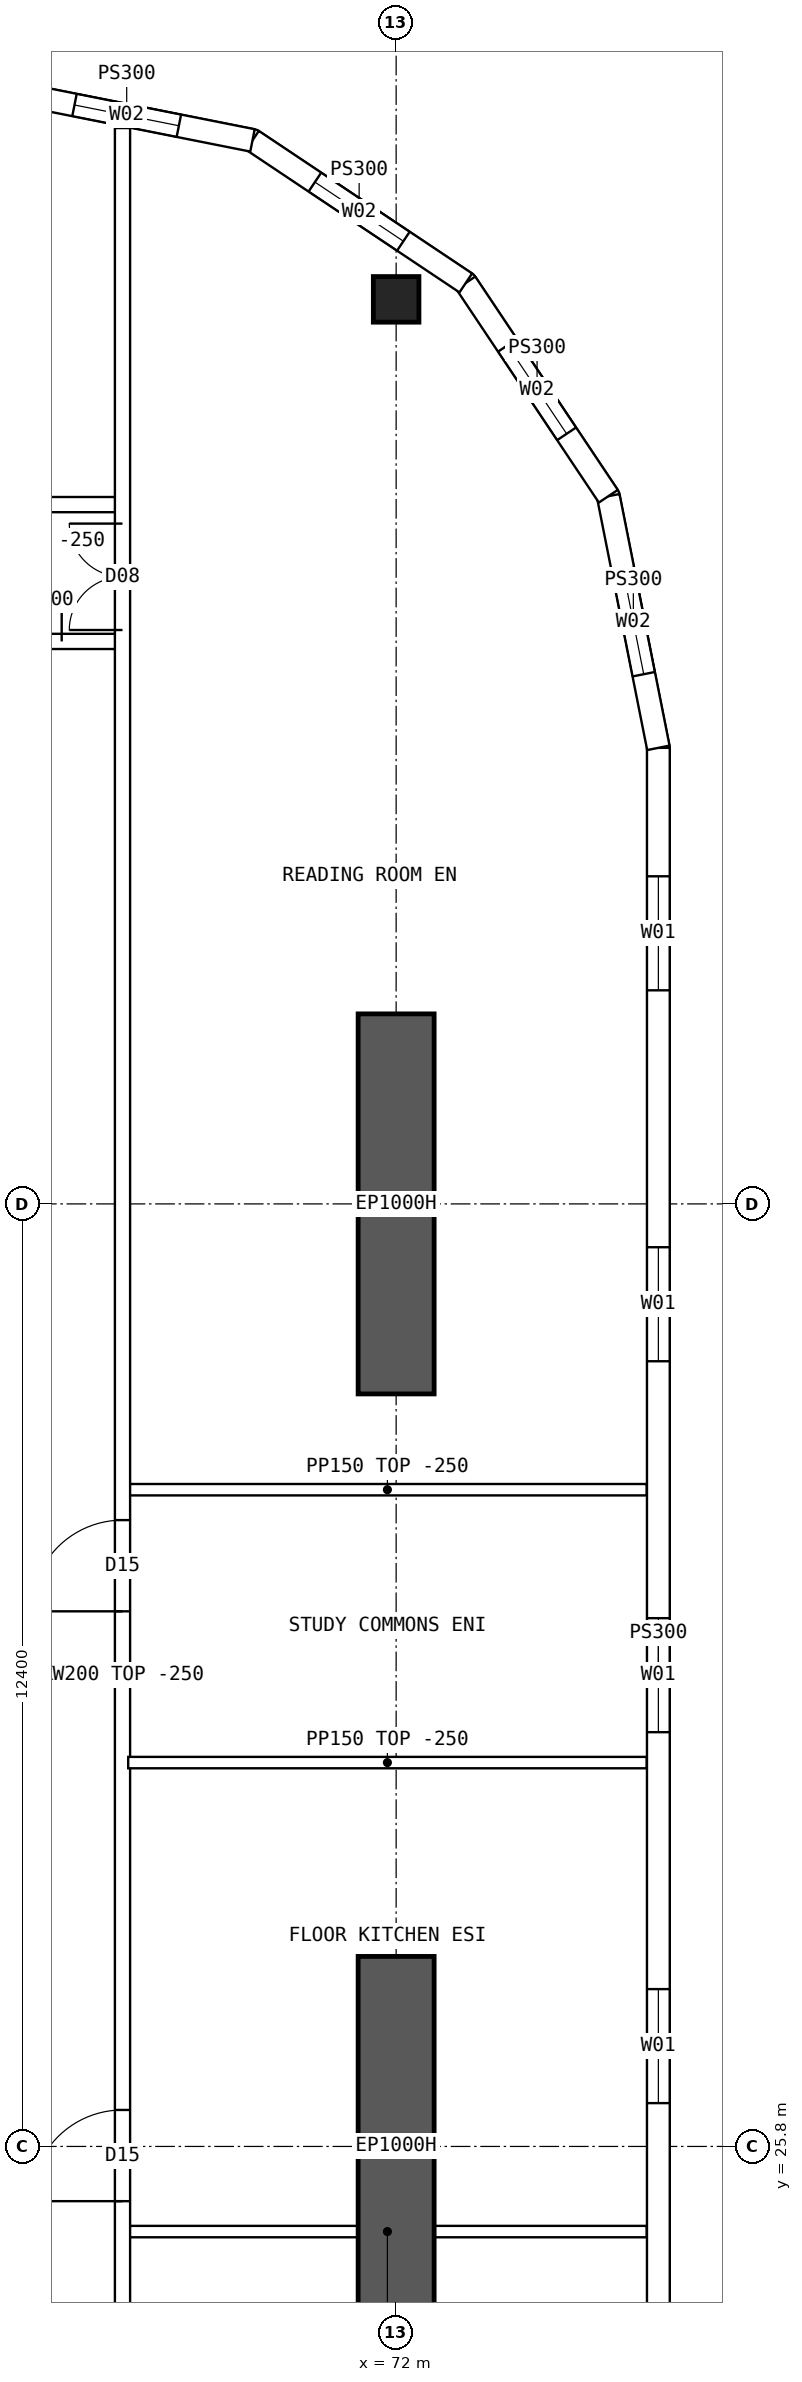
"""IFC4 building model, lengths in metres.
Left out: names, types, materials, properties, quantities, classifications, styles, units other than length and angle.
Written with IfcOpenShell. Run it as: python <this file> out.ifc"""

import sys

from ifc_helpers import new_model, si_unit, direction, frame, frame_2d, origin, origin_2d, place, context, subcontext, project, spatial, polyline, rectangle, hollow_rectangle, outline, extrude, element, fill, save


model = new_model("IFC4")
c1 = context("Model", 3, precision=1e-05, world=origin(), true_north=direction((0.0, 1.0)))
c2 = subcontext(c1, "Body", "Model", "MODEL_VIEW")
j1 = project(units=[si_unit("LENGTHUNIT", "METRE"), si_unit("PLANEANGLEUNIT", "RADIAN")], contexts=[c1])
p1 = place(None, origin())
s1 = spatial("IfcSite", under=j1, at=p1, CompositionType="ELEMENT")
p2 = place(p1, origin())
s2 = spatial("IfcBuilding", under=s1, at=p2, CompositionType="ELEMENT")
p3 = place(p2, frame((0.0, 0.0, 224.05)))
s3 = spatial("IfcBuildingStorey", under=s2, at=p3, CompositionType="ELEMENT", Elevation=224.05)
p4 = place(p3, frame((72.0, 50.1, 0.0), z_axis=(0.0, 0.0, 1.0), x_axis=(1.0, 0.0, 0.0)))
e1 = element("IfcColumn", 1, at=p4, inside=s3, PredefinedType="COLUMN", context=c2, shape_type="SweptSolid", body=[
    extrude(hollow_rectangle(XDim=0.6, YDim=0.6, WallThickness=0.06, at=origin_2d()), origin(), (0.0, 0.0, 1.0), 3.75),
])
for number, where, z_axis, x_axis in (
    (2, (72.0, 23.3, 0.0), (0.0, 0.0, 1.0), (0.0, 1.0, 0.0)),
    (3, (72.0, 35.7, 0.0), (0.0, 0.0, 1.0), (0.0, 1.0, 0.0)),
):
    element("IfcWall", number, at=place(p3, frame(where, z_axis=z_axis, x_axis=x_axis)), inside=s3, PredefinedType="SHEAR", context=c2, shape_type="SweptSolid", body=[
        extrude(rectangle(XDim=5.0, YDim=1.0, at=frame_2d((2.5, 0.0))), origin(), (0.0, 0.0, 1.0), 3.75),
    ])
p5 = place(p3, frame((75.45, 19.8, 0.0), z_axis=(0.0, 0.0, 1.0), x_axis=(0.0, 1.0, 0.0)))
e4 = element("IfcWall", 4, at=p5, inside=s3, PredefinedType="SOLIDWALL", context=c2, shape_type="SweptSolid", body=[
    extrude(outline(polyline([(-0.015, -0.15), (24.415, -0.15), (24.385, 0.15), (0.015, 0.15), (-0.015, -0.15)])), origin(), (0.0, 0.0, 1.0), 3.5),
])
p6 = place(p5, frame((1.69, 0.0, 0.9)))
e5 = element("IfcOpeningElement", 5, at=p6, cuts=e4, PredefinedType="OPENING", context=c2, shape_type="SweptSolid", body=[
    extrude(rectangle(XDim=1.5, YDim=2.0, at=frame_2d((0.75, 1.0))), frame((0.0, 0.16, 0.0), z_axis=(0.0, -1.0, 0.0), x_axis=(1.0, 0.0, 0.0)), (0.0, 0.0, 1.0), 0.32),
])
p7 = place(p5, frame((6.57, 0.0, 0.9)))
e6 = element("IfcOpeningElement", 6, at=p7, cuts=e4, PredefinedType="OPENING", context=c2, shape_type="SweptSolid", body=[
    extrude(rectangle(XDim=1.5, YDim=2.0, at=frame_2d((0.75, 1.0))), frame((0.0, 0.16, 0.0), z_axis=(0.0, -1.0, 0.0), x_axis=(1.0, 0.0, 0.0)), (0.0, 0.0, 1.0), 0.32),
])
p8 = place(p5, frame((11.45, 0.0, 0.9)))
e7 = element("IfcOpeningElement", 7, at=p8, cuts=e4, PredefinedType="OPENING", context=c2, shape_type="SweptSolid", body=[
    extrude(rectangle(XDim=1.5, YDim=2.0, at=frame_2d((0.75, 1.0))), frame((0.0, 0.16, 0.0), z_axis=(0.0, -1.0, 0.0), x_axis=(1.0, 0.0, 0.0)), (0.0, 0.0, 1.0), 0.32),
])
p9 = place(p5, frame((16.33, 0.0, 0.9)))
e8 = element("IfcOpeningElement", 8, at=p9, cuts=e4, PredefinedType="OPENING", context=c2, shape_type="SweptSolid", body=[
    extrude(rectangle(XDim=1.5, YDim=2.0, at=frame_2d((0.75, 1.0))), frame((0.0, 0.16, 0.0), z_axis=(0.0, -1.0, 0.0), x_axis=(1.0, 0.0, 0.0)), (0.0, 0.0, 1.0), 0.32),
])
p10 = place(p5, frame((21.21, 0.0, 0.9)))
e9 = element("IfcOpeningElement", 9, at=p10, cuts=e4, PredefinedType="OPENING", context=c2, shape_type="SweptSolid", body=[
    extrude(rectangle(XDim=1.5, YDim=2.0, at=frame_2d((0.75, 1.0))), frame((0.0, 0.16, 0.0), z_axis=(0.0, -1.0, 0.0), x_axis=(1.0, 0.0, 0.0)), (0.0, 0.0, 1.0), 0.32),
])
p11 = place(p3, frame((75.45, 44.2, 0.0), z_axis=(0.0, 0.0, 1.0), x_axis=(-0.19508664885, 0.980786011034, 0.0)))
e10 = element("IfcWall", 10, at=p11, inside=s3, PredefinedType="SOLIDWALL", context=c2, shape_type="SweptSolid", body=[
    extrude(outline(polyline([(-0.015, -0.15), (3.405, -0.15), (3.345, 0.15), (0.015, 0.15), (-0.015, -0.15)])), origin(), (0.0, 0.0, 1.0), 3.5),
])
p12 = place(p11, frame((0.988, 0.0, 0.9)))
e11 = element("IfcOpeningElement", 11, at=p12, cuts=e10, PredefinedType="OPENING", context=c2, shape_type="SweptSolid", body=[
    extrude(rectangle(XDim=1.4, YDim=1.8, at=frame_2d((0.7, 0.9))), frame((0.0, 0.16, 0.0), z_axis=(0.0, -1.0, 0.0), x_axis=(1.0, 0.0, 0.0)), (0.0, 0.0, 1.0), 0.32),
])
p13 = place(p3, frame((74.792, 47.51, 0.0), z_axis=(0.0, 0.0, 1.0), x_axis=(-0.555567969291, 0.831471124873, 0.0)))
e12 = element("IfcWall", 12, at=p13, inside=s3, PredefinedType="SOLIDWALL", context=c2, shape_type="SweptSolid", body=[
    extrude(outline(polyline([(-0.03, -0.15), (3.405, -0.15), (3.345, 0.15), (0.03, 0.15), (-0.03, -0.15)])), origin(), (0.0, 0.0, 1.0), 3.5),
])
p14 = place(p13, frame((0.988, 0.0, 0.9)))
e13 = element("IfcOpeningElement", 13, at=p14, cuts=e12, PredefinedType="OPENING", context=c2, shape_type="SweptSolid", body=[
    extrude(rectangle(XDim=1.4, YDim=1.8, at=frame_2d((0.7, 0.9))), frame((0.0, 0.16, 0.0), z_axis=(0.0, -1.0, 0.0), x_axis=(1.0, 0.0, 0.0)), (0.0, 0.0, 1.0), 0.32),
])
p15 = place(p3, frame((72.917, 50.316, 0.0), z_axis=(0.0, 0.0, 1.0), x_axis=(-0.831460037396, 0.555584562613, 0.0)))
e14 = element("IfcWall", 14, at=p15, inside=s3, PredefinedType="SOLIDWALL", context=c2, shape_type="SweptSolid", body=[
    extrude(outline(polyline([(-0.03, -0.15), (3.405, -0.15), (3.345, 0.15), (0.03, 0.15), (-0.03, -0.15)])), origin(), (0.0, 0.0, 1.0), 3.5),
])
p16 = place(p15, frame((0.988, 0.0, 0.9)))
e15 = element("IfcOpeningElement", 15, at=p16, cuts=e14, PredefinedType="OPENING", context=c2, shape_type="SweptSolid", body=[
    extrude(rectangle(XDim=1.4, YDim=1.8, at=frame_2d((0.7, 0.9))), frame((0.0, 0.16, 0.0), z_axis=(0.0, -1.0, 0.0), x_axis=(1.0, 0.0, 0.0)), (0.0, 0.0, 1.0), 0.32),
])
p17 = place(p3, frame((70.11, 52.192, 0.0), z_axis=(0.0, 0.0, 1.0), x_axis=(-0.98078325777, 0.195100490205, 0.0)))
e16 = element("IfcWall", 16, at=p17, inside=s3, PredefinedType="SOLIDWALL", context=c2, shape_type="SweptSolid", body=[
    extrude(outline(polyline([(-0.03, -0.15), (3.405, -0.15), (3.345, 0.15), (0.03, 0.15), (-0.03, -0.15)])), origin(), (0.0, 0.0, 1.0), 3.5),
])
p18 = place(p17, frame((0.988, 0.0, 0.9)))
e17 = element("IfcOpeningElement", 17, at=p18, cuts=e16, PredefinedType="OPENING", context=c2, shape_type="SweptSolid", body=[
    extrude(rectangle(XDim=1.4, YDim=1.8, at=frame_2d((0.7, 0.9))), frame((0.0, 0.16, 0.0), z_axis=(0.0, -1.0, 0.0), x_axis=(1.0, 0.0, 0.0)), (0.0, 0.0, 1.0), 0.32),
])
p19 = place(p3, frame((66.35, 47.4, 0.0), z_axis=(0.0, 0.0, 1.0), x_axis=(1.0, 0.0, 0.0)))
e18 = element("IfcWall", 18, at=p19, inside=s3, PredefinedType="SOLIDWALL", context=c2, shape_type="SweptSolid", body=[
    extrude(rectangle(XDim=2.05, YDim=0.2, at=frame_2d((1.025, 0.0))), origin(), (0.0, 0.0, 1.0), 3.5),
])
p20 = place(p19, frame((0.2, 0.0, 0.0)))
e19 = element("IfcOpeningElement", 19, at=p20, cuts=e18, PredefinedType="OPENING", context=c2, shape_type="SweptSolid", body=[
    extrude(rectangle(XDim=0.9, YDim=2.1, at=frame_2d((0.45, 1.05))), frame((0.0, 0.11, 0.0), z_axis=(0.0, -1.0, 0.0), x_axis=(1.0, 0.0, 0.0)), (0.0, 0.0, 1.0), 0.22),
])
p21 = place(p3, frame((66.35, 45.6, 0.0), z_axis=(0.0, 0.0, 1.0), x_axis=(1.0, 0.0, 0.0)))
e20 = element("IfcWall", 20, at=p21, inside=s3, PredefinedType="SOLIDWALL", context=c2, shape_type="SweptSolid", body=[
    extrude(rectangle(XDim=2.05, YDim=0.2, at=frame_2d((1.025, 0.0))), origin(), (0.0, 0.0, 1.0), 3.5),
])
p22 = place(p21, frame((0.05, 0.0, 0.0)))
e21 = element("IfcOpeningElement", 21, at=p22, cuts=e20, PredefinedType="OPENING", context=c2, shape_type="SweptSolid", body=[
    extrude(rectangle(XDim=1.2, YDim=2.1, at=frame_2d((0.6, 1.05))), frame((0.0, 0.11, 0.0), z_axis=(0.0, -1.0, 0.0), x_axis=(1.0, 0.0, 0.0)), (0.0, 0.0, 1.0), 0.22),
])
p23 = place(p3, frame((68.475, 30.85, 0.0), z_axis=(0.0, 0.0, 1.0), x_axis=(1.0, 0.0, 0.0)))
e22 = element("IfcWall", 22, at=p23, inside=s3, PredefinedType="PARTITIONING", context=c2, shape_type="SweptSolid", body=[
    extrude(outline(polyline([(0.0, 0.0), (6.82, 0.0), (6.82, 3.5), (3.827, 3.5), (3.825, 3.05), (3.227, 3.05), (3.225, 3.5), (0.0, 3.5), (0.0, 0.0)])), frame((0.0, 0.075, 0.0), z_axis=(0.0, -1.0, 0.0), x_axis=(1.0, 0.0, 0.0)), (0.0, 0.0, 1.0), 0.15),
])
p24 = place(p3, frame((68.4, 11.646, 0.0), z_axis=(0.0, 0.0, 1.0), x_axis=(0.0, 1.0, 0.0)))
e23 = element("IfcWall", 23, at=p24, inside=s3, PredefinedType="SOLIDWALL", context=c2, shape_type="SweptSolid", body=[
    extrude(rectangle(XDim=40.708, YDim=0.2, at=frame_2d((20.354, 0.0))), origin(), (0.0, 0.0, 1.0), 3.5),
])
p25 = place(p24, frame((13.434, 0.0, 0.0)))
e24 = element("IfcOpeningElement", 24, at=p25, cuts=e23, PredefinedType="OPENING", context=c2, shape_type="SweptSolid", body=[
    extrude(rectangle(XDim=1.2, YDim=2.1, at=frame_2d((0.6, 1.05))), frame((0.0, 0.11, 0.0), z_axis=(0.0, -1.0, 0.0), x_axis=(1.0, 0.0, 0.0)), (0.0, 0.0, 1.0), 0.22),
])
p26 = place(p24, frame((21.194, 0.0, 0.0)))
e25 = element("IfcOpeningElement", 25, at=p26, cuts=e23, PredefinedType="OPENING", context=c2, shape_type="SweptSolid", body=[
    extrude(rectangle(XDim=1.2, YDim=2.1, at=frame_2d((0.6, 1.05))), frame((0.0, 0.11, 0.0), z_axis=(0.0, -1.0, 0.0), x_axis=(1.0, 0.0, 0.0)), (0.0, 0.0, 1.0), 0.22),
])
p27 = place(p24, frame((5.104, 0.0, 0.0)))
e26 = element("IfcOpeningElement", 26, at=p27, cuts=e23, PredefinedType="OPENING", context=c2, shape_type="SweptSolid", body=[
    extrude(rectangle(XDim=1.4, YDim=2.1, at=frame_2d((0.7, 1.05))), frame((0.0, 0.11, 0.0), z_axis=(0.0, -1.0, 0.0), x_axis=(1.0, 0.0, 0.0)), (0.0, 0.0, 1.0), 0.22),
])
p28 = place(p24, frame((34.104, 0.0, 0.0)))
e27 = element("IfcOpeningElement", 27, at=p28, cuts=e23, PredefinedType="OPENING", context=c2, shape_type="SweptSolid", body=[
    extrude(rectangle(XDim=1.4, YDim=2.1, at=frame_2d((0.7, 1.05))), frame((0.0, 0.11, 0.0), z_axis=(0.0, -1.0, 0.0), x_axis=(1.0, 0.0, 0.0)), (0.0, 0.0, 1.0), 0.22),
])
p29 = place(p3, frame((68.475, 24.68, 0.0), z_axis=(0.0, 0.0, 1.0), x_axis=(1.0, 0.0, 0.0)))
e28 = element("IfcWall", 28, at=p29, inside=s3, PredefinedType="PARTITIONING", context=c2, shape_type="SweptSolid", body=[
    extrude(rectangle(XDim=6.82, YDim=0.15, at=frame_2d((3.41, 0.0))), origin(), (0.0, 0.0, 1.0), 3.5),
])
p30 = place(p3, frame((68.475, 34.44, 0.0), z_axis=(0.0, 0.0, 1.0), x_axis=(1.0, 0.0, 0.0)))
e29 = element("IfcWall", 29, at=p30, inside=s3, PredefinedType="PARTITIONING", context=c2, shape_type="SweptSolid", body=[
    extrude(outline(polyline([(0.0, 0.0), (6.82, 0.0), (6.82, 3.5), (3.827, 3.5), (3.825, 3.05), (3.227, 3.05), (3.225, 3.5), (0.0, 3.5), (0.0, 0.0)])), frame((0.0, 0.075, 0.0), z_axis=(0.0, -1.0, 0.0), x_axis=(1.0, 0.0, 0.0)), (0.0, 0.0, 1.0), 0.15),
])
p31 = place(p7, origin())
e30 = element("IfcWindow", 30, at=p31, inside=s3, PartitioningType="SINGLE_PANEL", PredefinedType="WINDOW", context=c2, shape_type="SweptSolid", body=[
    extrude(rectangle(XDim=1.5, YDim=2.0, at=frame_2d((0.75, 1.0))), frame((0.0, 0.03, 0.0), z_axis=(0.0, -1.0, 0.0), x_axis=(1.0, 0.0, 0.0)), (0.0, 0.0, 1.0), 0.06),
])
fill(e6, e30)
p32 = place(p8, origin())
e31 = element("IfcWindow", 31, at=p32, inside=s3, PartitioningType="SINGLE_PANEL", PredefinedType="WINDOW", context=c2, shape_type="SweptSolid", body=[
    extrude(rectangle(XDim=1.5, YDim=2.0, at=frame_2d((0.75, 1.0))), frame((0.0, 0.03, 0.0), z_axis=(0.0, -1.0, 0.0), x_axis=(1.0, 0.0, 0.0)), (0.0, 0.0, 1.0), 0.06),
])
fill(e7, e31)
p33 = place(p9, origin())
e32 = element("IfcWindow", 32, at=p33, inside=s3, PartitioningType="SINGLE_PANEL", PredefinedType="WINDOW", context=c2, shape_type="SweptSolid", body=[
    extrude(rectangle(XDim=1.5, YDim=2.0, at=frame_2d((0.75, 1.0))), frame((0.0, 0.03, 0.0), z_axis=(0.0, -1.0, 0.0), x_axis=(1.0, 0.0, 0.0)), (0.0, 0.0, 1.0), 0.06),
])
fill(e8, e32)
p34 = place(p10, origin())
e33 = element("IfcWindow", 33, at=p34, inside=s3, PartitioningType="SINGLE_PANEL", PredefinedType="WINDOW", context=c2, shape_type="SweptSolid", body=[
    extrude(rectangle(XDim=1.5, YDim=2.0, at=frame_2d((0.75, 1.0))), frame((0.0, 0.03, 0.0), z_axis=(0.0, -1.0, 0.0), x_axis=(1.0, 0.0, 0.0)), (0.0, 0.0, 1.0), 0.06),
])
fill(e9, e33)
p35 = place(p12, origin())
e34 = element("IfcWindow", 34, at=p35, inside=s3, PartitioningType="SINGLE_PANEL", PredefinedType="WINDOW", context=c2, shape_type="SweptSolid", body=[
    extrude(rectangle(XDim=1.4, YDim=1.8, at=frame_2d((0.7, 0.9))), frame((0.0, 0.03, 0.0), z_axis=(0.0, -1.0, 0.0), x_axis=(1.0, 0.0, 0.0)), (0.0, 0.0, 1.0), 0.06),
])
fill(e11, e34)
p36 = place(p14, origin())
e35 = element("IfcWindow", 35, at=p36, inside=s3, PartitioningType="SINGLE_PANEL", PredefinedType="WINDOW", context=c2, shape_type="SweptSolid", body=[
    extrude(rectangle(XDim=1.4, YDim=1.8, at=frame_2d((0.7, 0.9))), frame((0.0, 0.03, 0.0), z_axis=(0.0, -1.0, 0.0), x_axis=(1.0, 0.0, 0.0)), (0.0, 0.0, 1.0), 0.06),
])
fill(e13, e35)
p37 = place(p16, origin())
e36 = element("IfcWindow", 36, at=p37, inside=s3, PartitioningType="SINGLE_PANEL", PredefinedType="WINDOW", context=c2, shape_type="SweptSolid", body=[
    extrude(rectangle(XDim=1.4, YDim=1.8, at=frame_2d((0.7, 0.9))), frame((0.0, 0.03, 0.0), z_axis=(0.0, -1.0, 0.0), x_axis=(1.0, 0.0, 0.0)), (0.0, 0.0, 1.0), 0.06),
])
fill(e15, e36)
p38 = place(p18, origin())
e37 = element("IfcWindow", 37, at=p38, inside=s3, PartitioningType="SINGLE_PANEL", PredefinedType="WINDOW", context=c2, shape_type="SweptSolid", body=[
    extrude(rectangle(XDim=1.4, YDim=1.8, at=frame_2d((0.7, 0.9))), frame((0.0, 0.03, 0.0), z_axis=(0.0, -1.0, 0.0), x_axis=(1.0, 0.0, 0.0)), (0.0, 0.0, 1.0), 0.06),
])
fill(e17, e37)
p39 = place(p22, origin())
e38 = element("IfcDoor", 38, at=p39, inside=s3, OperationType="DOUBLE_DOOR_SINGLE_SWING", PredefinedType="DOOR", context=c2, shape_type="SweptSolid", body=[
    extrude(rectangle(XDim=1.2, YDim=2.1, at=frame_2d((0.6, 1.05))), frame((0.0, 0.025, 0.0), z_axis=(0.0, -1.0, 0.0), x_axis=(1.0, 0.0, 0.0)), (0.0, 0.0, 1.0), 0.05),
])
fill(e21, e38)
p40 = place(p25, origin())
e39 = element("IfcDoor", 39, at=p40, inside=s3, OperationType="SINGLE_SWING_LEFT", PredefinedType="DOOR", context=c2, shape_type="SweptSolid", body=[
    extrude(rectangle(XDim=1.2, YDim=2.1, at=frame_2d((0.6, 1.05))), frame((0.0, 0.025, 0.0), z_axis=(0.0, -1.0, 0.0), x_axis=(1.0, 0.0, 0.0)), (0.0, 0.0, 1.0), 0.05),
])
fill(e24, e39)
p41 = place(p26, origin())
e40 = element("IfcDoor", 40, at=p41, inside=s3, OperationType="SINGLE_SWING_LEFT", PredefinedType="DOOR", context=c2, shape_type="SweptSolid", body=[
    extrude(rectangle(XDim=1.2, YDim=2.1, at=frame_2d((0.6, 1.05))), frame((0.0, 0.025, 0.0), z_axis=(0.0, -1.0, 0.0), x_axis=(1.0, 0.0, 0.0)), (0.0, 0.0, 1.0), 0.05),
])
fill(e25, e40)
p42 = place(p28, origin())
e41 = element("IfcDoor", 41, at=p42, inside=s3, OperationType="DOUBLE_DOOR_SINGLE_SWING", PredefinedType="DOOR", context=c2, shape_type="SweptSolid", body=[
    extrude(rectangle(XDim=1.4, YDim=2.1, at=frame_2d((0.7, 1.05))), frame((0.0, 0.025, 0.0), z_axis=(0.0, -1.0, 0.0), x_axis=(1.0, 0.0, 0.0)), (0.0, 0.0, 1.0), 0.05),
])
fill(e27, e41)
save(model, sys.argv[1])
